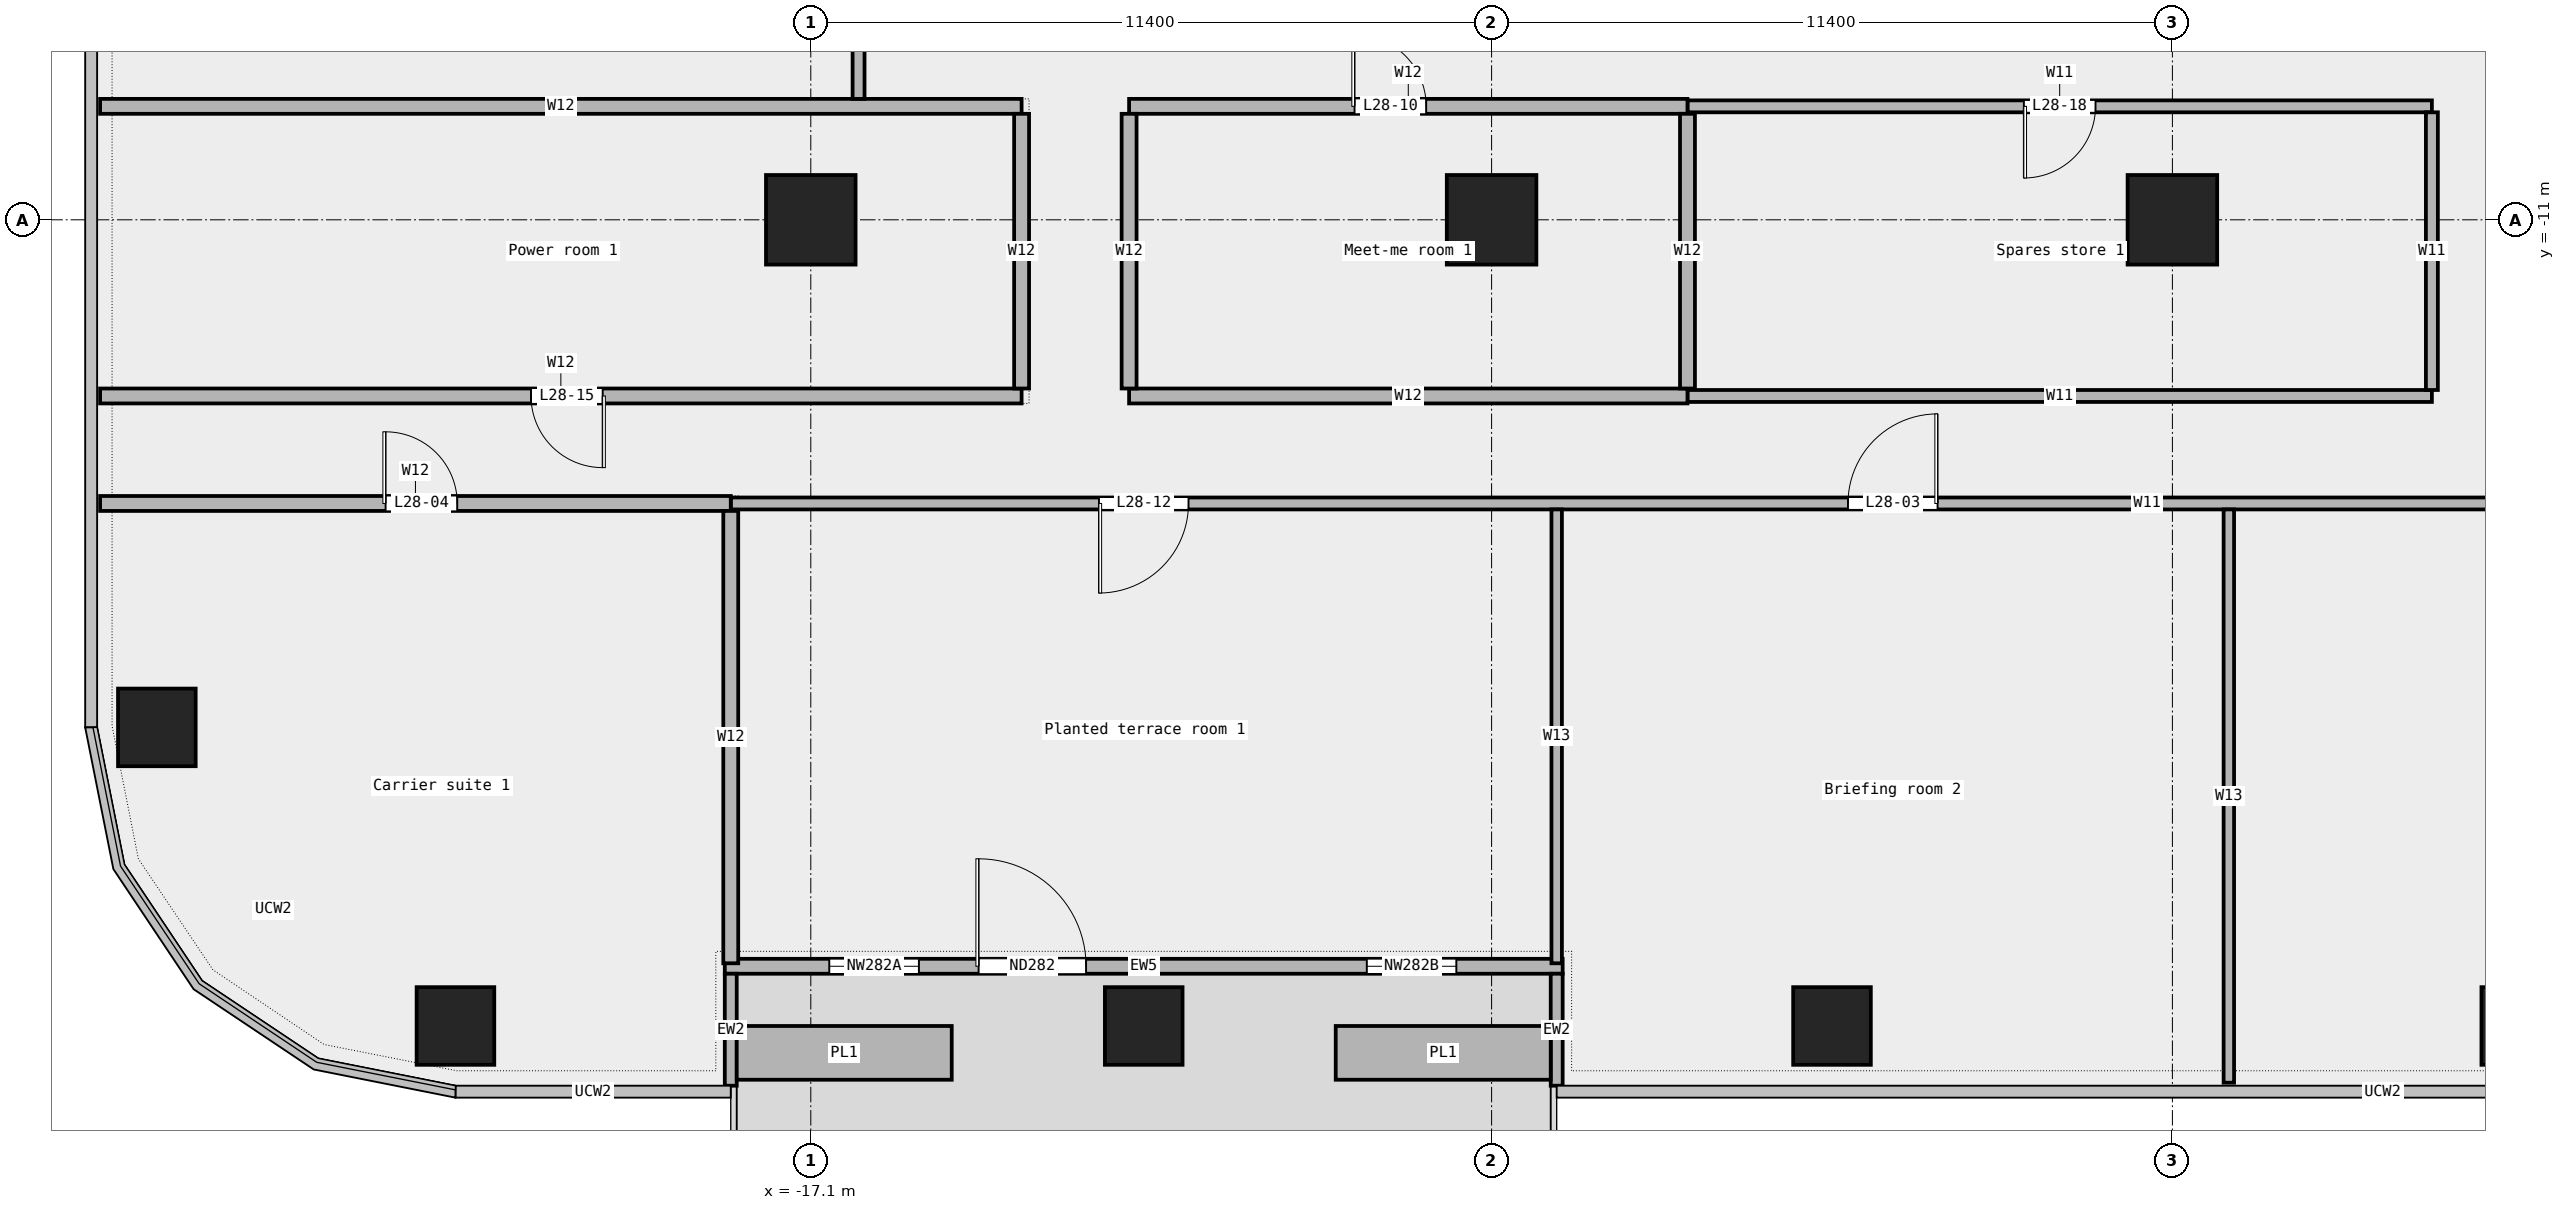
"""IFC4 building model, lengths in metres.
Left out: names, types, materials, properties, quantities, classifications, styles, units other than length and angle.
Written with IfcOpenShell. Run it as: python <this file> out.ifc"""

import sys

from ifc_helpers import new_model, si_unit, direction, frame, frame_2d, origin, origin_2d, place, context, subcontext, project, spatial, rectangle, extrude, element, fill, save


model = new_model("IFC4")
c1 = context("Model", 3, precision=1e-05, world=origin(), true_north=direction((0.0, 1.0)))
c2 = subcontext(c1, "Body", "Model", "MODEL_VIEW")
j1 = project(units=[si_unit("LENGTHUNIT", "METRE"), si_unit("PLANEANGLEUNIT", "RADIAN")], contexts=[c1])
p1 = place(None, origin())
s1 = spatial("IfcSite", under=j1, at=p1, CompositionType="ELEMENT")
p2 = place(p1, origin())
s2 = spatial("IfcBuilding", under=s1, at=p2, CompositionType="ELEMENT")
p3 = place(p2, frame((0.0, 0.0, 139.6)))
s3 = spatial("IfcBuildingStorey", under=s2, at=p3, CompositionType="ELEMENT", Elevation=139.6)
for number, where, z_axis, x_axis in (
    (1, (-23.05, -24.5, 0.0), (0.0, 0.0, 1.0), (1.0, 0.0, 0.0)),
    (2, (-11.525, -24.5, 0.0), (0.0, 0.0, 1.0), (1.0, 0.0, 0.0)),
    (3, (0.0, -24.5, 0.0), (0.0, 0.0, 1.0), (1.0, 0.0, 0.0)),
    (4, (11.525, -24.5, 0.0), (0.0, 0.0, 1.0), (1.0, 0.0, 0.0)),
    (5, (-28.05, -19.5, 0.0), (0.0, 0.0, 1.0), (1.0, 0.0, 0.0)),
):
    element("IfcColumn", number, at=place(p3, frame(where, z_axis=z_axis, x_axis=x_axis)), inside=s3, PredefinedType="COLUMN", context=c2, shape_type="SweptSolid", body=[
        extrude(rectangle(XDim=1.3, YDim=1.3, at=origin_2d()), origin(), (0.0, 0.0, 1.0), 4.05),
    ])
for number, where, z_axis, x_axis in (
    (6, (-17.1, -11.0, 0.0), (0.0, 0.0, 1.0), (1.0, 0.0, 0.0)),
    (7, (-5.7, -11.0, 0.0), (0.0, 0.0, 1.0), (1.0, 0.0, 0.0)),
    (8, (5.7, -11.0, 0.0), (0.0, 0.0, 1.0), (1.0, 0.0, 0.0)),
):
    element("IfcColumn", number, at=place(p3, frame(where, z_axis=z_axis, x_axis=x_axis)), inside=s3, PredefinedType="COLUMN", context=c2, shape_type="SweptSolid", body=[
        extrude(rectangle(XDim=1.5, YDim=1.5, at=origin_2d()), origin(), (0.0, 0.0, 1.0), 4.05),
    ])
p4 = place(p3, frame((-18.54, -23.5, 0.0), z_axis=(0.0, 0.0, 1.0), x_axis=(1.0, 0.0, 0.0)))
e9 = element("IfcWall", 9, at=p4, inside=s3, PredefinedType="STANDARD", context=c2, shape_type="SweptSolid", body=[
    extrude(rectangle(XDim=14.03, YDim=0.25, at=frame_2d((7.015, 0.0))), origin(), (0.0, 0.0, 1.0), 4.05),
])
p5 = place(p4, frame((1.75, 0.0, 0.45)))
e10 = element("IfcOpeningElement", 10, at=p5, cuts=e9, PredefinedType="OPENING", context=c2, shape_type="SweptSolid", body=[
    extrude(rectangle(XDim=1.5, YDim=3.0, at=frame_2d((0.75, 1.5))), frame((0.0, 0.137, 0.0), z_axis=(0.0, -1.0, 0.0), x_axis=(1.0, 0.0, 0.0)), (0.0, 0.0, 1.0), 0.274),
])
p6 = place(p4, frame((4.25, 0.0, 0.0)))
e11 = element("IfcOpeningElement", 11, at=p6, cuts=e9, PredefinedType="OPENING", context=c2, shape_type="SweptSolid", body=[
    extrude(rectangle(XDim=1.8, YDim=2.4, at=frame_2d((0.9, 1.2))), frame((0.0, 0.137, 0.0), z_axis=(0.0, -1.0, 0.0), x_axis=(1.0, 0.0, 0.0)), (0.0, 0.0, 1.0), 0.274),
])
p7 = place(p4, frame((10.75, 0.0, 0.45)))
e12 = element("IfcOpeningElement", 12, at=p7, cuts=e9, PredefinedType="OPENING", context=c2, shape_type="SweptSolid", body=[
    extrude(rectangle(XDim=1.5, YDim=3.0, at=frame_2d((0.75, 1.5))), frame((0.0, 0.137, 0.0), z_axis=(0.0, -1.0, 0.0), x_axis=(1.0, 0.0, 0.0)), (0.0, 0.0, 1.0), 0.274),
])
for number, where, z_axis, x_axis in (
    (13, (-18.44, -25.5, 0.0), (0.0, 0.0, 1.0), (0.0, 1.0, 0.0)),
    (14, (-4.61, -25.5, 0.0), (0.0, 0.0, 1.0), (0.0, 1.0, 0.0)),
):
    element("IfcWall", number, at=place(p3, frame(where, z_axis=z_axis, x_axis=x_axis)), inside=s3, PredefinedType="STANDARD", context=c2, shape_type="SweptSolid", body=[
        extrude(rectangle(XDim=1.875, YDim=0.2, at=frame_2d((0.938, 0.0))), origin(), (0.0, 0.0, 1.0), 4.05),
    ])
for number, where, z_axis, x_axis in (
    (15, (-18.34, -24.95, 0.0), (0.0, 0.0, 1.0), (1.0, 0.0, 0.0)),
    (16, (-8.31, -24.95, 0.0), (0.0, 0.0, 1.0), (1.0, 0.0, 0.0)),
):
    element("IfcWall", number, at=place(p3, frame(where, z_axis=z_axis, x_axis=x_axis)), inside=s3, PredefinedType="STANDARD", context=c2, shape_type="SweptSolid", body=[
        extrude(rectangle(XDim=3.6, YDim=0.9, at=frame_2d((1.8, 0.0))), origin(), (0.0, 0.0, 1.0), 0.7),
    ])
p8 = place(p3, frame((-18.44, -15.75, 0.0), z_axis=(0.0, 0.0, 1.0), x_axis=(1.0, 0.0, 0.0)))
e17 = element("IfcWall", 17, at=p8, inside=s3, PredefinedType="PARTITIONING", context=c2, shape_type="SweptSolid", body=[
    extrude(rectangle(XDim=47.44, YDim=0.2, at=frame_2d((23.72, 0.0))), origin(), (0.0, 0.0, 1.0), 4.05),
])
p9 = place(p8, frame((18.708, 0.0, 0.0)))
e18 = element("IfcOpeningElement", 18, at=p9, cuts=e17, PredefinedType="OPENING", context=c2, shape_type="SweptSolid", body=[
    extrude(rectangle(XDim=1.5, YDim=2.1, at=frame_2d((0.75, 1.05))), frame((0.0, 0.112, 0.0), z_axis=(0.0, -1.0, 0.0), x_axis=(1.0, 0.0, 0.0)), (0.0, 0.0, 1.0), 0.224),
])
p10 = place(p8, frame((6.165, 0.0, 0.0)))
e19 = element("IfcOpeningElement", 19, at=p10, cuts=e17, PredefinedType="OPENING", context=c2, shape_type="SweptSolid", body=[
    extrude(rectangle(XDim=1.5, YDim=2.1, at=frame_2d((0.75, 1.05))), frame((0.0, 0.112, 0.0), z_axis=(0.0, -1.0, 0.0), x_axis=(1.0, 0.0, 0.0)), (0.0, 0.0, 1.0), 0.224),
])
p11 = place(p8, frame((35.262, 0.0, 0.0)))
e20 = element("IfcOpeningElement", 20, at=p11, cuts=e17, PredefinedType="OPENING", context=c2, shape_type="SweptSolid", body=[
    extrude(rectangle(XDim=1.8, YDim=2.1, at=frame_2d((0.9, 1.05))), frame((0.0, 0.112, 0.0), z_axis=(0.0, -1.0, 0.0), x_axis=(1.0, 0.0, 0.0)), (0.0, 0.0, 1.0), 0.224),
])
p12 = place(p3, frame((-29.0, -15.75, 0.0), z_axis=(0.0, 0.0, 1.0), x_axis=(1.0, 0.0, 0.0)))
e21 = element("IfcWall", 21, at=p12, inside=s3, PredefinedType="PARTITIONING", context=c2, shape_type="SweptSolid", body=[
    extrude(rectangle(XDim=10.56, YDim=0.25, at=frame_2d((5.28, 0.0))), origin(), (0.0, 0.0, 1.0), 4.05),
])
p13 = place(p12, frame((4.78, 0.0, 0.0)))
e22 = element("IfcOpeningElement", 22, at=p13, cuts=e21, PredefinedType="OPENING", context=c2, shape_type="SweptSolid", body=[
    extrude(rectangle(XDim=1.2, YDim=2.1, at=frame_2d((0.6, 1.05))), frame((0.0, 0.137, 0.0), z_axis=(0.0, -1.0, 0.0), x_axis=(1.0, 0.0, 0.0)), (0.0, 0.0, 1.0), 0.274),
])
p14 = place(p3, frame((-2.42, -13.95, 0.0), z_axis=(0.0, 0.0, 1.0), x_axis=(1.0, 0.0, 0.0)))
e23 = element("IfcWall", 23, at=p14, inside=s3, PredefinedType="PARTITIONING", context=c2, shape_type="SweptSolid", body=[
    extrude(rectangle(XDim=12.465, YDim=0.2, at=frame_2d((6.232, 0.0))), origin(), (0.0, 0.0, 1.0), 4.05),
])
p15 = place(p3, frame((-29.0, -13.95, 0.0), z_axis=(0.0, 0.0, 1.0), x_axis=(1.0, 0.0, 0.0)))
e24 = element("IfcWall", 24, at=p15, inside=s3, PredefinedType="PARTITIONING", context=c2, shape_type="SweptSolid", body=[
    extrude(rectangle(XDim=15.43, YDim=0.25, at=frame_2d((7.715, 0.0))), origin(), (0.0, 0.0, 1.0), 4.05),
])
p16 = place(p15, frame((7.215, 0.0, 0.0)))
e25 = element("IfcOpeningElement", 25, at=p16, cuts=e24, PredefinedType="OPENING", context=c2, shape_type="SweptSolid", body=[
    extrude(rectangle(XDim=1.2, YDim=2.1, at=frame_2d((0.6, 1.05))), frame((0.0, 0.137, 0.0), z_axis=(0.0, -1.0, 0.0), x_axis=(1.0, 0.0, 0.0)), (0.0, 0.0, 1.0), 0.274),
])
p17 = place(p3, frame((-11.77, -13.95, 0.0), z_axis=(0.0, 0.0, 1.0), x_axis=(1.0, 0.0, 0.0)))
e26 = element("IfcWall", 26, at=p17, inside=s3, PredefinedType="PARTITIONING", context=c2, shape_type="SweptSolid", body=[
    extrude(rectangle(XDim=9.35, YDim=0.25, at=frame_2d((4.675, 0.0))), origin(), (0.0, 0.0, 1.0), 4.05),
])
p18 = place(p3, frame((-2.42, -9.1, 0.0), z_axis=(0.0, 0.0, 1.0), x_axis=(1.0, 0.0, 0.0)))
e27 = element("IfcWall", 27, at=p18, inside=s3, PredefinedType="PARTITIONING", context=c2, shape_type="SweptSolid", body=[
    extrude(rectangle(XDim=12.465, YDim=0.2, at=frame_2d((6.232, 0.0))), origin(), (0.0, 0.0, 1.0), 4.05),
])
p19 = place(p18, frame((5.633, 0.0, 0.0)))
e28 = element("IfcOpeningElement", 28, at=p19, cuts=e27, PredefinedType="OPENING", context=c2, shape_type="SweptSolid", body=[
    extrude(rectangle(XDim=1.2, YDim=2.1, at=frame_2d((0.6, 1.05))), frame((0.0, 0.112, 0.0), z_axis=(0.0, -1.0, 0.0), x_axis=(1.0, 0.0, 0.0)), (0.0, 0.0, 1.0), 0.224),
])
p20 = place(p3, frame((-29.0, -9.1, 0.0), z_axis=(0.0, 0.0, 1.0), x_axis=(1.0, 0.0, 0.0)))
e29 = element("IfcWall", 29, at=p20, inside=s3, PredefinedType="PARTITIONING", context=c2, shape_type="SweptSolid", body=[
    extrude(rectangle(XDim=15.43, YDim=0.25, at=frame_2d((7.715, 0.0))), origin(), (0.0, 0.0, 1.0), 4.05),
])
p21 = place(p3, frame((-11.77, -9.1, 0.0), z_axis=(0.0, 0.0, 1.0), x_axis=(1.0, 0.0, 0.0)))
e30 = element("IfcWall", 30, at=p21, inside=s3, PredefinedType="PARTITIONING", context=c2, shape_type="SweptSolid", body=[
    extrude(rectangle(XDim=9.35, YDim=0.25, at=frame_2d((4.675, 0.0))), origin(), (0.0, 0.0, 1.0), 4.05),
])
p22 = place(p21, frame((3.775, 0.0, 0.0)))
e31 = element("IfcOpeningElement", 31, at=p22, cuts=e30, PredefinedType="OPENING", context=c2, shape_type="SweptSolid", body=[
    extrude(rectangle(XDim=1.2, YDim=2.1, at=frame_2d((0.6, 1.05))), frame((0.0, 0.137, 0.0), z_axis=(0.0, -1.0, 0.0), x_axis=(1.0, 0.0, 0.0)), (0.0, 0.0, 1.0), 0.274),
])
p23 = place(p3, frame((-18.44, -23.45, 0.0), z_axis=(0.0, 0.0, 1.0), x_axis=(0.0, 1.0, 0.0)))
e32 = element("IfcWall", 32, at=p23, inside=s3, PredefinedType="PARTITIONING", context=c2, shape_type="SweptSolid", body=[
    extrude(rectangle(XDim=7.575, YDim=0.25, at=frame_2d((3.788, 0.0))), origin(), (0.0, 0.0, 1.0), 4.05),
])
p24 = place(p3, frame((-16.3, -8.975, 0.0), z_axis=(0.0, 0.0, 1.0), x_axis=(0.0, 1.0, 0.0)))
e33 = element("IfcWall", 33, at=p24, inside=s3, PredefinedType="PARTITIONING", context=c2, shape_type="SweptSolid", body=[
    extrude(rectangle(XDim=8.225, YDim=0.2, at=frame_2d((4.113, 0.0))), origin(), (0.0, 0.0, 1.0), 4.05),
])
p25 = place(p24, frame((3.363, 0.0, 0.0)))
e34 = element("IfcOpeningElement", 34, at=p25, cuts=e33, PredefinedType="OPENING", context=c2, shape_type="SweptSolid", body=[
    extrude(rectangle(XDim=1.5, YDim=2.1, at=frame_2d((0.75, 1.05))), frame((0.0, 0.112, 0.0), z_axis=(0.0, -1.0, 0.0), x_axis=(1.0, 0.0, 0.0)), (0.0, 0.0, 1.0), 0.224),
])
for number, where, z_axis, x_axis in (
    (35, (-13.57, -13.825, 0.0), (0.0, 0.0, 1.0), (0.0, 1.0, 0.0)),
    (36, (-11.77, -13.825, 0.0), (0.0, 0.0, 1.0), (0.0, 1.0, 0.0)),
):
    element("IfcWall", number, at=place(p3, frame(where, z_axis=z_axis, x_axis=x_axis)), inside=s3, PredefinedType="PARTITIONING", context=c2, shape_type="SweptSolid", body=[
        extrude(rectangle(XDim=4.6, YDim=0.25, at=frame_2d((2.3, 0.0))), origin(), (0.0, 0.0, 1.0), 4.05),
    ])
p26 = place(p3, frame((-4.61, -23.45, 0.0), z_axis=(0.0, 0.0, 1.0), x_axis=(0.0, 1.0, 0.0)))
e37 = element("IfcWall", 37, at=p26, inside=s3, PredefinedType="PARTITIONING", context=c2, shape_type="SweptSolid", body=[
    extrude(rectangle(XDim=7.6, YDim=0.175, at=frame_2d((3.8, 0.0))), origin(), (0.0, 0.0, 1.0), 4.05),
])
p27 = place(p3, frame((-2.42, -13.825, 0.0), z_axis=(0.0, 0.0, 1.0), x_axis=(0.0, 1.0, 0.0)))
e38 = element("IfcWall", 38, at=p27, inside=s3, PredefinedType="PARTITIONING", context=c2, shape_type="SweptSolid", body=[
    extrude(rectangle(XDim=4.6, YDim=0.25, at=frame_2d((2.3, 0.0))), origin(), (0.0, 0.0, 1.0), 4.05),
])
p28 = place(p3, frame((6.645, -25.45, 0.0), z_axis=(0.0, 0.0, 1.0), x_axis=(0.0, 1.0, 0.0)))
e39 = element("IfcWall", 39, at=p28, inside=s3, PredefinedType="PARTITIONING", context=c2, shape_type="SweptSolid", body=[
    extrude(rectangle(XDim=9.6, YDim=0.175, at=frame_2d((4.8, 0.0))), origin(), (0.0, 0.0, 1.0), 4.05),
])
p29 = place(p3, frame((10.045, -13.85, 0.0), z_axis=(0.0, 0.0, 1.0), x_axis=(0.0, 1.0, 0.0)))
e40 = element("IfcWall", 40, at=p29, inside=s3, PredefinedType="PARTITIONING", context=c2, shape_type="SweptSolid", body=[
    extrude(rectangle(XDim=4.65, YDim=0.2, at=frame_2d((2.325, 0.0))), origin(), (0.0, 0.0, 1.0), 4.05),
])
p30 = place(p5, origin())
e41 = element("IfcWindow", 41, at=p30, inside=s3, PartitioningType="SINGLE_PANEL", PredefinedType="WINDOW", context=c2, shape_type="SweptSolid", body=[
    extrude(rectangle(XDim=1.5, YDim=3.0, at=frame_2d((0.75, 1.5))), frame((0.0, 0.03, 0.0), z_axis=(0.0, -1.0, 0.0), x_axis=(1.0, 0.0, 0.0)), (0.0, 0.0, 1.0), 0.06),
])
fill(e10, e41)
p31 = place(p6, origin())
e42 = element("IfcDoor", 42, at=p31, inside=s3, OperationType="DOUBLE_DOOR_SINGLE_SWING", PredefinedType="DOOR", context=c2, shape_type="SweptSolid", body=[
    extrude(rectangle(XDim=1.8, YDim=2.4, at=frame_2d((0.9, 1.2))), frame((0.0, 0.025, 0.0), z_axis=(0.0, -1.0, 0.0), x_axis=(1.0, 0.0, 0.0)), (0.0, 0.0, 1.0), 0.05),
])
fill(e11, e42)
p32 = place(p7, origin())
e43 = element("IfcWindow", 43, at=p32, inside=s3, PartitioningType="SINGLE_PANEL", PredefinedType="WINDOW", context=c2, shape_type="SweptSolid", body=[
    extrude(rectangle(XDim=1.5, YDim=3.0, at=frame_2d((0.75, 1.5))), frame((0.0, 0.03, 0.0), z_axis=(0.0, -1.0, 0.0), x_axis=(1.0, 0.0, 0.0)), (0.0, 0.0, 1.0), 0.06),
])
fill(e12, e43)
p33 = place(p9, origin())
e44 = element("IfcDoor", 44, at=p33, inside=s3, OperationType="DOUBLE_DOOR_SINGLE_SWING", PredefinedType="DOOR", context=c2, shape_type="SweptSolid", body=[
    extrude(rectangle(XDim=1.5, YDim=2.1, at=frame_2d((0.75, 1.05))), frame((0.0, 0.025, 0.0), z_axis=(0.0, -1.0, 0.0), x_axis=(1.0, 0.0, 0.0)), (0.0, 0.0, 1.0), 0.05),
])
fill(e18, e44)
p34 = place(p13, origin())
e45 = element("IfcDoor", 45, at=p34, inside=s3, OperationType="SINGLE_SWING_LEFT", PredefinedType="DOOR", context=c2, shape_type="SweptSolid", body=[
    extrude(rectangle(XDim=1.2, YDim=2.1, at=frame_2d((0.6, 1.05))), frame((0.0, 0.025, 0.0), z_axis=(0.0, -1.0, 0.0), x_axis=(1.0, 0.0, 0.0)), (0.0, 0.0, 1.0), 0.05),
])
fill(e22, e45)
p35 = place(p22, origin())
e46 = element("IfcDoor", 46, at=p35, inside=s3, OperationType="SINGLE_SWING_LEFT", PredefinedType="DOOR", context=c2, shape_type="SweptSolid", body=[
    extrude(rectangle(XDim=1.2, YDim=2.1, at=frame_2d((0.6, 1.05))), frame((0.0, 0.025, 0.0), z_axis=(0.0, -1.0, 0.0), x_axis=(1.0, 0.0, 0.0)), (0.0, 0.0, 1.0), 0.05),
])
fill(e31, e46)
p36 = place(p10, origin())
e47 = element("IfcDoor", 47, at=p36, inside=s3, OperationType="DOUBLE_DOOR_SINGLE_SWING", PredefinedType="DOOR", context=c2, shape_type="SweptSolid", body=[
    extrude(rectangle(XDim=1.5, YDim=2.1, at=frame_2d((0.75, 1.05))), frame((0.0, 0.025, 0.0), z_axis=(0.0, -1.0, 0.0), x_axis=(1.0, 0.0, 0.0)), (0.0, 0.0, 1.0), 0.05),
])
fill(e19, e47)
p37 = place(p16, origin())
e48 = element("IfcDoor", 48, at=p37, inside=s3, OperationType="SINGLE_SWING_LEFT", PredefinedType="DOOR", context=c2, shape_type="SweptSolid", body=[
    extrude(rectangle(XDim=1.2, YDim=2.1, at=frame_2d((0.6, 1.05))), frame((0.0, 0.025, 0.0), z_axis=(0.0, -1.0, 0.0), x_axis=(1.0, 0.0, 0.0)), (0.0, 0.0, 1.0), 0.05),
])
fill(e25, e48)
p38 = place(p19, origin())
e49 = element("IfcDoor", 49, at=p38, inside=s3, OperationType="SINGLE_SWING_RIGHT", PredefinedType="DOOR", context=c2, shape_type="SweptSolid", body=[
    extrude(rectangle(XDim=1.2, YDim=2.1, at=frame_2d((0.6, 1.05))), frame((0.0, 0.025, 0.0), z_axis=(0.0, -1.0, 0.0), x_axis=(1.0, 0.0, 0.0)), (0.0, 0.0, 1.0), 0.05),
])
fill(e28, e49)
save(model, sys.argv[1])
